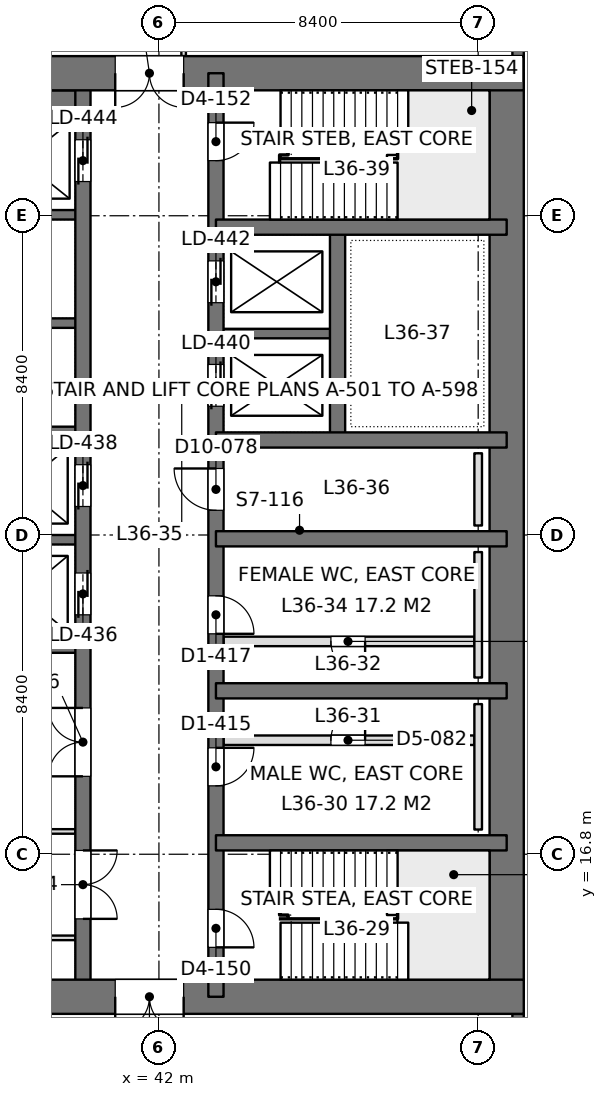
"""IFC4 building model, lengths in metres.
Left out: names, types, materials, properties, quantities, classifications, styles, units other than length and angle.
Written with IfcOpenShell. Run it as: python <this file> out.ifc"""

import sys

from ifc_helpers import new_model, si_unit, direction, frame, frame_2d, origin, place, context, subcontext, project, spatial, rectangle, extrude, element, fill, save


model = new_model("IFC4")
c1 = context("Model", 3, precision=1e-05, world=origin(), true_north=direction((0.0, 1.0)))
c2 = subcontext(c1, "Body", "Model", "MODEL_VIEW")
j1 = project(units=[si_unit("LENGTHUNIT", "METRE"), si_unit("PLANEANGLEUNIT", "RADIAN")], contexts=[c1])
p1 = place(None, origin())
s1 = spatial("IfcSite", under=j1, at=p1, CompositionType="ELEMENT")
p2 = place(p1, origin())
s2 = spatial("IfcBuilding", under=s1, at=p2, CompositionType="ELEMENT")
p3 = place(p2, frame((0.0, 0.0, 159.6)))
s3 = spatial("IfcBuildingStorey", under=s2, at=p3, CompositionType="ELEMENT", Elevation=159.6)
p4 = place(p3, frame((33.6, 13.05, 0.0), z_axis=(0.0, 0.0, 1.0), x_axis=(1.0, 0.0, 0.0)))
e1 = element("IfcWall", 1, at=p4, inside=s3, PredefinedType="SHEAR", context=c2, shape_type="SweptSolid", body=[
    extrude(rectangle(XDim=18.0, YDim=0.9, at=frame_2d((9.0, 0.0))), origin(), (0.0, 0.0, 1.0), 4.2),
])
p5 = place(p4, frame((7.25, 0.0, 0.0)))
e2 = element("IfcOpeningElement", 2, at=p5, cuts=e1, PredefinedType="OPENING", context=c2, shape_type="SweptSolid", body=[
    extrude(rectangle(XDim=1.8, YDim=2.4, at=frame_2d((0.9, 1.2))), frame((0.0, 0.46, 0.0), z_axis=(0.0, -1.0, 0.0), x_axis=(1.0, 0.0, 0.0)), (0.0, 0.0, 1.0), 0.92),
])
p6 = place(p3, frame((33.6, 37.35, 0.0), z_axis=(0.0, 0.0, 1.0), x_axis=(1.0, 0.0, 0.0)))
e3 = element("IfcWall", 3, at=p6, inside=s3, PredefinedType="SHEAR", context=c2, shape_type="SweptSolid", body=[
    extrude(rectangle(XDim=18.0, YDim=0.9, at=frame_2d((9.0, 0.0))), origin(), (0.0, 0.0, 1.0), 4.2),
])
p7 = place(p6, frame((7.25, 0.0, 0.0)))
e4 = element("IfcOpeningElement", 4, at=p7, cuts=e3, PredefinedType="OPENING", context=c2, shape_type="SweptSolid", body=[
    extrude(rectangle(XDim=1.8, YDim=2.4, at=frame_2d((0.9, 1.2))), frame((0.0, 0.46, 0.0), z_axis=(0.0, -1.0, 0.0), x_axis=(1.0, 0.0, 0.0)), (0.0, 0.0, 1.0), 0.92),
])
p8 = place(p3, frame((51.15, 13.05, 0.0), z_axis=(0.0, 0.0, 1.0), x_axis=(0.0, 1.0, 0.0)))
e5 = element("IfcWall", 5, at=p8, inside=s3, PredefinedType="SHEAR", context=c2, shape_type="SweptSolid", body=[
    extrude(rectangle(XDim=24.3, YDim=0.9, at=frame_2d((12.15, 0.0))), origin(), (0.0, 0.0, 1.0), 4.2),
])
p9 = place(p3, frame((43.5, 13.05, 0.0), z_axis=(0.0, 0.0, 1.0), x_axis=(0.0, 1.0, 0.0)))
e6 = element("IfcWall", 6, at=p9, inside=s3, PredefinedType="SHEAR", context=c2, shape_type="SweptSolid", body=[
    extrude(rectangle(XDim=24.3, YDim=0.4, at=frame_2d((12.15, 0.0))), origin(), (0.0, 0.0, 1.0), 4.2),
])
p10 = place(p9, frame((1.3, 0.0, 0.0)))
e7 = element("IfcOpeningElement", 7, at=p10, cuts=e6, PredefinedType="OPENING", context=c2, shape_type="SweptSolid", body=[
    extrude(rectangle(XDim=1.0, YDim=2.2, at=frame_2d((0.5, 1.1))), frame((0.0, 0.21, 0.0), z_axis=(0.0, -1.0, 0.0), x_axis=(1.0, 0.0, 0.0)), (0.0, 0.0, 1.0), 0.42),
])
p11 = place(p9, frame((22.0, 0.0, 0.0)))
e8 = element("IfcOpeningElement", 8, at=p11, cuts=e6, PredefinedType="OPENING", context=c2, shape_type="SweptSolid", body=[
    extrude(rectangle(XDim=1.0, YDim=2.2, at=frame_2d((0.5, 1.1))), frame((0.0, 0.21, 0.0), z_axis=(0.0, -1.0, 0.0), x_axis=(1.0, 0.0, 0.0)), (0.0, 0.0, 1.0), 0.42),
])
p12 = place(p9, frame((5.55, 0.0, 0.0)))
e9 = element("IfcOpeningElement", 9, at=p12, cuts=e6, PredefinedType="OPENING", context=c2, shape_type="SweptSolid", body=[
    extrude(rectangle(XDim=1.0, YDim=2.2, at=frame_2d((0.5, 1.1))), frame((0.0, 0.21, 0.0), z_axis=(0.0, -1.0, 0.0), x_axis=(1.0, 0.0, 0.0)), (0.0, 0.0, 1.0), 0.42),
])
p13 = place(p9, frame((9.55, 0.0, 0.0)))
e10 = element("IfcOpeningElement", 10, at=p13, cuts=e6, PredefinedType="OPENING", context=c2, shape_type="SweptSolid", body=[
    extrude(rectangle(XDim=1.0, YDim=2.2, at=frame_2d((0.5, 1.1))), frame((0.0, 0.21, 0.0), z_axis=(0.0, -1.0, 0.0), x_axis=(1.0, 0.0, 0.0)), (0.0, 0.0, 1.0), 0.42),
])
p14 = place(p9, frame((12.8, 0.0, 0.0)))
e11 = element("IfcOpeningElement", 11, at=p14, cuts=e6, PredefinedType="OPENING", context=c2, shape_type="SweptSolid", body=[
    extrude(rectangle(XDim=1.1, YDim=2.2, at=frame_2d((0.55, 1.1))), frame((0.0, 0.21, 0.0), z_axis=(0.0, -1.0, 0.0), x_axis=(1.0, 0.0, 0.0)), (0.0, 0.0, 1.0), 0.42),
])
p15 = place(p9, frame((15.538, 0.0, 0.0)))
e12 = element("IfcOpeningElement", 12, at=p15, cuts=e6, PredefinedType="OPENING", context=c2, shape_type="SweptSolid", body=[
    extrude(rectangle(XDim=1.1, YDim=2.2, at=frame_2d((0.55, 1.1))), frame((0.0, 0.21, 0.0), z_axis=(0.0, -1.0, 0.0), x_axis=(1.0, 0.0, 0.0)), (0.0, 0.0, 1.0), 0.42),
])
p16 = place(p9, frame((18.262, 0.0, 0.0)))
e13 = element("IfcOpeningElement", 13, at=p16, cuts=e6, PredefinedType="OPENING", context=c2, shape_type="SweptSolid", body=[
    extrude(rectangle(XDim=1.1, YDim=2.2, at=frame_2d((0.55, 1.1))), frame((0.0, 0.21, 0.0), z_axis=(0.0, -1.0, 0.0), x_axis=(1.0, 0.0, 0.0)), (0.0, 0.0, 1.0), 0.42),
])
p17 = place(p3, frame((40.0, 13.05, 0.0), z_axis=(0.0, 0.0, 1.0), x_axis=(0.0, 1.0, 0.0)))
e14 = element("IfcWall", 14, at=p17, inside=s3, PredefinedType="SHEAR", context=c2, shape_type="SweptSolid", body=[
    extrude(rectangle(XDim=24.3, YDim=0.4, at=frame_2d((12.15, 0.0))), origin(), (0.0, 0.0, 1.0), 4.2),
])
p18 = place(p17, frame((10.05, 0.0, 0.0)))
e15 = element("IfcOpeningElement", 15, at=p18, cuts=e14, PredefinedType="OPENING", context=c2, shape_type="SweptSolid", body=[
    extrude(rectangle(XDim=1.1, YDim=2.2, at=frame_2d((0.55, 1.1))), frame((0.0, 0.21, 0.0), z_axis=(0.0, -1.0, 0.0), x_axis=(1.0, 0.0, 0.0)), (0.0, 0.0, 1.0), 0.42),
])
p19 = place(p17, frame((12.9, 0.0, 0.0)))
e16 = element("IfcOpeningElement", 16, at=p19, cuts=e14, PredefinedType="OPENING", context=c2, shape_type="SweptSolid", body=[
    extrude(rectangle(XDim=1.1, YDim=2.2, at=frame_2d((0.55, 1.1))), frame((0.0, 0.21, 0.0), z_axis=(0.0, -1.0, 0.0), x_axis=(1.0, 0.0, 0.0)), (0.0, 0.0, 1.0), 0.42),
])
p20 = place(p17, frame((21.45, 0.0, 0.0)))
e17 = element("IfcOpeningElement", 17, at=p20, cuts=e14, PredefinedType="OPENING", context=c2, shape_type="SweptSolid", body=[
    extrude(rectangle(XDim=1.1, YDim=2.2, at=frame_2d((0.55, 1.1))), frame((0.0, 0.21, 0.0), z_axis=(0.0, -1.0, 0.0), x_axis=(1.0, 0.0, 0.0)), (0.0, 0.0, 1.0), 0.42),
])
p21 = place(p17, frame((2.05, 0.0, 0.0)))
e18 = element("IfcOpeningElement", 18, at=p21, cuts=e14, PredefinedType="OPENING", context=c2, shape_type="SweptSolid", body=[
    extrude(rectangle(XDim=1.8, YDim=2.4, at=frame_2d((0.9, 1.2))), frame((0.0, 0.21, 0.0), z_axis=(0.0, -1.0, 0.0), x_axis=(1.0, 0.0, 0.0)), (0.0, 0.0, 1.0), 0.42),
])
p22 = place(p17, frame((5.8, 0.0, 0.0)))
e19 = element("IfcOpeningElement", 19, at=p22, cuts=e14, PredefinedType="OPENING", context=c2, shape_type="SweptSolid", body=[
    extrude(rectangle(XDim=1.8, YDim=2.4, at=frame_2d((0.9, 1.2))), frame((0.0, 0.21, 0.0), z_axis=(0.0, -1.0, 0.0), x_axis=(1.0, 0.0, 0.0)), (0.0, 0.0, 1.0), 0.42),
])
for number, where, z_axis, x_axis in (
    (20, (51.15, 17.1, 0.0), (0.0, 0.0, 1.0), (-1.0, 0.0, 0.0)),
    (21, (51.15, 21.1, 0.0), (0.0, 0.0, 1.0), (-1.0, 0.0, 0.0)),
    (22, (51.15, 25.1, 0.0), (0.0, 0.0, 1.0), (-1.0, 0.0, 0.0)),
    (23, (51.15, 27.7, 0.0), (0.0, 0.0, 1.0), (-1.0, 0.0, 0.0)),
    (24, (51.15, 33.3, 0.0), (0.0, 0.0, 1.0), (-1.0, 0.0, 0.0)),
):
    element("IfcWall", number, at=place(p3, frame(where, z_axis=z_axis, x_axis=x_axis)), inside=s3, PredefinedType="SHEAR", context=c2, shape_type="SweptSolid", body=[
        extrude(rectangle(XDim=7.65, YDim=0.4, at=frame_2d((3.825, 0.0))), origin(), (0.0, 0.0, 1.0), 4.2),
    ])
p23 = place(p3, frame((46.7, 27.7, 0.0), z_axis=(0.0, 0.0, 1.0), x_axis=(0.0, 1.0, 0.0)))
e25 = element("IfcWall", 25, at=p23, inside=s3, PredefinedType="SHEAR", context=c2, shape_type="SweptSolid", body=[
    extrude(rectangle(XDim=5.6, YDim=0.4, at=frame_2d((2.8, 0.0))), origin(), (0.0, 0.0, 1.0), 4.2),
])
p24 = place(p3, frame((46.7, 30.5, 0.0), z_axis=(0.0, 0.0, 1.0), x_axis=(-1.0, 0.0, 0.0)))
e26 = element("IfcWall", 26, at=p24, inside=s3, PredefinedType="SHEAR", context=c2, shape_type="SweptSolid", body=[
    extrude(rectangle(XDim=3.2, YDim=0.25, at=frame_2d((1.6, 0.0))), origin(), (0.0, 0.0, 1.0), 4.2),
])
p25 = place(p3, frame((40.0, 22.225, 0.0), z_axis=(0.0, 0.0, 1.0), x_axis=(-1.0, 0.0, 0.0)))
e27 = element("IfcWall", 27, at=p25, inside=s3, PredefinedType="SHEAR", context=c2, shape_type="SweptSolid", body=[
    extrude(rectangle(XDim=5.95, YDim=0.25, at=frame_2d((2.975, 0.0))), origin(), (0.0, 0.0, 1.0), 4.2),
])
for number, where, z_axis, x_axis in (
    (28, (40.0, 25.075, 0.0), (0.0, 0.0, 1.0), (-1.0, 0.0, 0.0)),
    (29, (40.0, 27.925, 0.0), (0.0, 0.0, 1.0), (-1.0, 0.0, 0.0)),
    (30, (40.0, 30.775, 0.0), (0.0, 0.0, 1.0), (-1.0, 0.0, 0.0)),
    (31, (40.0, 33.625, 0.0), (0.0, 0.0, 1.0), (-1.0, 0.0, 0.0)),
):
    element("IfcWall", number, at=place(p3, frame(where, z_axis=z_axis, x_axis=x_axis)), inside=s3, PredefinedType="SHEAR", context=c2, shape_type="SweptSolid", body=[
        extrude(rectangle(XDim=3.2, YDim=0.25, at=frame_2d((1.6, 0.0))), origin(), (0.0, 0.0, 1.0), 4.2),
    ])
p26 = place(p3, frame((40.0, 36.625, 0.0), z_axis=(0.0, 0.0, 1.0), x_axis=(-1.0, 0.0, 0.0)))
e32 = element("IfcWall", 32, at=p26, inside=s3, PredefinedType="SHEAR", context=c2, shape_type="SweptSolid", body=[
    extrude(rectangle(XDim=3.2, YDim=0.55, at=frame_2d((1.6, 0.0))), origin(), (0.0, 0.0, 1.0), 4.2),
])
p27 = place(p3, frame((51.45, 42.0, 0.0), z_axis=(0.0, 0.0, 1.0), x_axis=(0.0, -1.0, 0.0)))
e33 = element("IfcWall", 33, at=p27, inside=s3, PredefinedType="SOLIDWALL", context=c2, shape_type="SweptSolid", body=[
    extrude(rectangle(XDim=4.2, YDim=0.3, at=frame_2d((2.1, 0.0))), origin(), (0.0, 0.0, 1.0), 4.05),
])
p28 = place(p27, frame((0.9, 0.0, 0.9)))
e34 = element("IfcOpeningElement", 34, at=p28, cuts=e33, PredefinedType="OPENING", context=c2, shape_type="SweptSolid", body=[
    extrude(rectangle(XDim=2.4, YDim=1.9, at=frame_2d((1.2, 0.95))), frame((0.0, 0.16, 0.0), z_axis=(0.0, -1.0, 0.0), x_axis=(1.0, 0.0, 0.0)), (0.0, 0.0, 1.0), 0.32),
])
p29 = place(p3, frame((51.45, 12.6, 0.0), z_axis=(0.0, 0.0, 1.0), x_axis=(0.0, -1.0, 0.0)))
e35 = element("IfcWall", 35, at=p29, inside=s3, PredefinedType="SOLIDWALL", context=c2, shape_type="SweptSolid", body=[
    extrude(rectangle(XDim=4.2, YDim=0.3, at=frame_2d((2.1, 0.0))), origin(), (0.0, 0.0, 1.0), 4.05),
])
p30 = place(p29, frame((0.9, 0.0, 0.9)))
e36 = element("IfcOpeningElement", 36, at=p30, cuts=e35, PredefinedType="OPENING", context=c2, shape_type="SweptSolid", body=[
    extrude(rectangle(XDim=2.4, YDim=1.9, at=frame_2d((1.2, 0.95))), frame((0.0, 0.16, 0.0), z_axis=(0.0, -1.0, 0.0), x_axis=(1.0, 0.0, 0.0)), (0.0, 0.0, 1.0), 0.32),
])
p31 = place(p3, frame((33.898, 17.4, 0.0), z_axis=(0.0, 0.0, 1.0), x_axis=(1.0, 0.0, 0.0)))
e37 = element("IfcWall", 37, at=p31, inside=s3, PredefinedType="PARTITIONING", context=c2, shape_type="SweptSolid", body=[
    extrude(rectangle(XDim=5.904, YDim=0.12, at=frame_2d((2.952, 0.0))), origin(), (0.0, 0.0, 1.0), 3.55),
])
p32 = place(p3, frame((33.598, 14.6, 0.0), z_axis=(0.0, 0.0, 1.0), x_axis=(1.0, 0.0, 0.0)))
e38 = element("IfcWall", 38, at=p32, inside=s3, PredefinedType="PARTITIONING", context=c2, shape_type="SweptSolid", body=[
    extrude(rectangle(XDim=6.204, YDim=0.12, at=frame_2d((3.102, 0.0))), origin(), (0.0, 0.0, 1.0), 3.55),
])
p33 = place(p3, frame((42.65, 37.8, 0.0), z_axis=(0.0, 0.0, 1.0), x_axis=(0.0, 1.0, 0.0)))
e39 = element("IfcWall", 39, at=p33, inside=s3, PredefinedType="PARTITIONING", context=c2, shape_type="SweptSolid", body=[
    extrude(rectangle(XDim=2.0, YDim=0.12, at=frame_2d((1.0, 0.0))), origin(), (0.0, 0.0, 1.0), 4.05),
])
p34 = place(p3, frame((43.7, 22.4, 0.0), z_axis=(0.0, 0.0, 1.0), x_axis=(1.0, 0.0, 0.0)))
e40 = element("IfcWall", 40, at=p34, inside=s3, PredefinedType="PARTITIONING", context=c2, shape_type="SweptSolid", body=[
    extrude(rectangle(XDim=6.6, YDim=0.25, at=frame_2d((3.3, 0.0))), origin(), (0.0, 0.0, 1.0), 4.0),
])
p35 = place(p34, frame((2.825, 0.0, 0.0)))
e41 = element("IfcOpeningElement", 41, at=p35, cuts=e40, PredefinedType="OPENING", context=c2, shape_type="SweptSolid", body=[
    extrude(rectangle(XDim=0.9, YDim=2.2, at=frame_2d((0.45, 1.1))), frame((0.0, 0.135, 0.0), z_axis=(0.0, -1.0, 0.0), x_axis=(1.0, 0.0, 0.0)), (0.0, 0.0, 1.0), 0.27),
])
p36 = place(p3, frame((43.7, 19.8, 0.0), z_axis=(0.0, 0.0, 1.0), x_axis=(1.0, 0.0, 0.0)))
e42 = element("IfcWall", 42, at=p36, inside=s3, PredefinedType="PARTITIONING", context=c2, shape_type="SweptSolid", body=[
    extrude(rectangle(XDim=6.6, YDim=0.25, at=frame_2d((3.3, 0.0))), origin(), (0.0, 0.0, 1.0), 4.0),
])
p37 = place(p36, frame((2.825, 0.0, 0.0)))
e43 = element("IfcOpeningElement", 43, at=p37, cuts=e42, PredefinedType="OPENING", context=c2, shape_type="SweptSolid", body=[
    extrude(rectangle(XDim=0.9, YDim=2.2, at=frame_2d((0.45, 1.1))), frame((0.0, 0.135, 0.0), z_axis=(0.0, -1.0, 0.0), x_axis=(1.0, 0.0, 0.0)), (0.0, 0.0, 1.0), 0.27),
])
for number, where, z_axis, x_axis in (
    (44, (50.4, 17.45, 0.0), (0.0, 0.0, 1.0), (0.0, 1.0, 0.0)),
    (45, (50.4, 21.45, 0.0), (0.0, 0.0, 1.0), (0.0, 1.0, 0.0)),
):
    element("IfcWall", number, at=place(p3, frame(where, z_axis=z_axis, x_axis=x_axis)), inside=s3, PredefinedType="PLUMBINGWALL", context=c2, shape_type="SweptSolid", body=[
        extrude(rectangle(XDim=3.3, YDim=0.2, at=frame_2d((1.65, 0.0))), origin(), (0.0, 0.0, 1.0), 1.2),
    ])
p38 = place(p3, frame((50.4, 25.45, 0.0), z_axis=(0.0, 0.0, 1.0), x_axis=(0.0, 1.0, 0.0)))
e46 = element("IfcWall", 46, at=p38, inside=s3, PredefinedType="PLUMBINGWALL", context=c2, shape_type="SweptSolid", body=[
    extrude(rectangle(XDim=1.9, YDim=0.2, at=frame_2d((0.95, 0.0))), origin(), (0.0, 0.0, 1.0), 1.2),
])
p39 = place(p5, frame((1.8, 0.0, 0.0), z_axis=(0.0, 0.0, 1.0), x_axis=(-1.0, 0.0, 0.0)))
e47 = element("IfcDoor", 47, at=p39, inside=s3, OperationType="DOUBLE_DOOR_SINGLE_SWING", PredefinedType="DOOR", context=c2, shape_type="SweptSolid", body=[
    extrude(rectangle(XDim=1.8, YDim=2.4, at=frame_2d((0.9, 1.2))), frame((0.0, 0.025, 0.0), z_axis=(0.0, -1.0, 0.0), x_axis=(1.0, 0.0, 0.0)), (0.0, 0.0, 1.0), 0.05),
])
fill(e2, e47)
p40 = place(p7, frame((1.8, 0.0, 0.0), z_axis=(0.0, 0.0, 1.0), x_axis=(-1.0, 0.0, 0.0)))
e48 = element("IfcDoor", 48, at=p40, inside=s3, OperationType="DOUBLE_DOOR_SINGLE_SWING", PredefinedType="DOOR", context=c2, shape_type="SweptSolid", body=[
    extrude(rectangle(XDim=1.8, YDim=2.4, at=frame_2d((0.9, 1.2))), frame((0.0, 0.025, 0.0), z_axis=(0.0, -1.0, 0.0), x_axis=(1.0, 0.0, 0.0)), (0.0, 0.0, 1.0), 0.05),
])
fill(e4, e48)
p41 = place(p10, frame((1.0, 0.0, 0.0), z_axis=(0.0, 0.0, 1.0), x_axis=(-1.0, 0.0, 0.0)))
e49 = element("IfcDoor", 49, at=p41, inside=s3, OperationType="SINGLE_SWING_RIGHT", PredefinedType="DOOR", context=c2, shape_type="SweptSolid", body=[
    extrude(rectangle(XDim=1.0, YDim=2.2, at=frame_2d((0.5, 1.1))), frame((0.0, 0.025, 0.0), z_axis=(0.0, -1.0, 0.0), x_axis=(1.0, 0.0, 0.0)), (0.0, 0.0, 1.0), 0.05),
])
fill(e7, e49)
p42 = place(p11, frame((1.0, 0.0, 0.0), z_axis=(0.0, 0.0, 1.0), x_axis=(-1.0, 0.0, 0.0)))
e50 = element("IfcDoor", 50, at=p42, inside=s3, OperationType="SINGLE_SWING_LEFT", PredefinedType="DOOR", context=c2, shape_type="SweptSolid", body=[
    extrude(rectangle(XDim=1.0, YDim=2.2, at=frame_2d((0.5, 1.1))), frame((0.0, 0.025, 0.0), z_axis=(0.0, -1.0, 0.0), x_axis=(1.0, 0.0, 0.0)), (0.0, 0.0, 1.0), 0.05),
])
fill(e8, e50)
p43 = place(p12, frame((1.0, 0.0, 0.0), z_axis=(0.0, 0.0, 1.0), x_axis=(-1.0, 0.0, 0.0)))
e51 = element("IfcDoor", 51, at=p43, inside=s3, OperationType="SINGLE_SWING_LEFT", PredefinedType="DOOR", context=c2, shape_type="SweptSolid", body=[
    extrude(rectangle(XDim=1.0, YDim=2.2, at=frame_2d((0.5, 1.1))), frame((0.0, 0.025, 0.0), z_axis=(0.0, -1.0, 0.0), x_axis=(1.0, 0.0, 0.0)), (0.0, 0.0, 1.0), 0.05),
])
fill(e9, e51)
p44 = place(p13, frame((1.0, 0.0, 0.0), z_axis=(0.0, 0.0, 1.0), x_axis=(-1.0, 0.0, 0.0)))
e52 = element("IfcDoor", 52, at=p44, inside=s3, OperationType="SINGLE_SWING_RIGHT", PredefinedType="DOOR", context=c2, shape_type="SweptSolid", body=[
    extrude(rectangle(XDim=1.0, YDim=2.2, at=frame_2d((0.5, 1.1))), frame((0.0, 0.025, 0.0), z_axis=(0.0, -1.0, 0.0), x_axis=(1.0, 0.0, 0.0)), (0.0, 0.0, 1.0), 0.05),
])
fill(e10, e52)
p45 = place(p14, origin())
e53 = element("IfcDoor", 53, at=p45, inside=s3, OperationType="SINGLE_SWING_RIGHT", PredefinedType="DOOR", context=c2, shape_type="SweptSolid", body=[
    extrude(rectangle(XDim=1.1, YDim=2.2, at=frame_2d((0.55, 1.1))), frame((0.0, 0.025, 0.0), z_axis=(0.0, -1.0, 0.0), x_axis=(1.0, 0.0, 0.0)), (0.0, 0.0, 1.0), 0.05),
])
fill(e11, e53)
p46 = place(p18, origin())
e54 = element("IfcDoor", 54, at=p46, inside=s3, OperationType="DOUBLE_DOOR_SLIDING", PredefinedType="DOOR", context=c2, shape_type="SweptSolid", body=[
    extrude(rectangle(XDim=1.1, YDim=2.2, at=frame_2d((0.55, 1.1))), frame((0.0, 0.025, 0.0), z_axis=(0.0, -1.0, 0.0), x_axis=(1.0, 0.0, 0.0)), (0.0, 0.0, 1.0), 0.05),
])
fill(e15, e54)
p47 = place(p19, origin())
e55 = element("IfcDoor", 55, at=p47, inside=s3, OperationType="DOUBLE_DOOR_SLIDING", PredefinedType="DOOR", context=c2, shape_type="SweptSolid", body=[
    extrude(rectangle(XDim=1.1, YDim=2.2, at=frame_2d((0.55, 1.1))), frame((0.0, 0.025, 0.0), z_axis=(0.0, -1.0, 0.0), x_axis=(1.0, 0.0, 0.0)), (0.0, 0.0, 1.0), 0.05),
])
fill(e16, e55)
p48 = place(p20, origin())
e56 = element("IfcDoor", 56, at=p48, inside=s3, OperationType="DOUBLE_DOOR_SLIDING", PredefinedType="DOOR", context=c2, shape_type="SweptSolid", body=[
    extrude(rectangle(XDim=1.1, YDim=2.2, at=frame_2d((0.55, 1.1))), frame((0.0, 0.025, 0.0), z_axis=(0.0, -1.0, 0.0), x_axis=(1.0, 0.0, 0.0)), (0.0, 0.0, 1.0), 0.05),
])
fill(e17, e56)
p49 = place(p15, origin())
e57 = element("IfcDoor", 57, at=p49, inside=s3, OperationType="DOUBLE_DOOR_SLIDING", PredefinedType="DOOR", context=c2, shape_type="SweptSolid", body=[
    extrude(rectangle(XDim=1.1, YDim=2.2, at=frame_2d((0.55, 1.1))), frame((0.0, 0.025, 0.0), z_axis=(0.0, -1.0, 0.0), x_axis=(1.0, 0.0, 0.0)), (0.0, 0.0, 1.0), 0.05),
])
fill(e12, e57)
p50 = place(p16, origin())
e58 = element("IfcDoor", 58, at=p50, inside=s3, OperationType="DOUBLE_DOOR_SLIDING", PredefinedType="DOOR", context=c2, shape_type="SweptSolid", body=[
    extrude(rectangle(XDim=1.1, YDim=2.2, at=frame_2d((0.55, 1.1))), frame((0.0, 0.025, 0.0), z_axis=(0.0, -1.0, 0.0), x_axis=(1.0, 0.0, 0.0)), (0.0, 0.0, 1.0), 0.05),
])
fill(e13, e58)
p51 = place(p21, frame((1.8, 0.0, 0.0), z_axis=(0.0, 0.0, 1.0), x_axis=(-1.0, 0.0, 0.0)))
e59 = element("IfcDoor", 59, at=p51, inside=s3, OperationType="DOUBLE_DOOR_SINGLE_SWING", PredefinedType="DOOR", context=c2, shape_type="SweptSolid", body=[
    extrude(rectangle(XDim=1.8, YDim=2.4, at=frame_2d((0.9, 1.2))), frame((0.0, 0.025, 0.0), z_axis=(0.0, -1.0, 0.0), x_axis=(1.0, 0.0, 0.0)), (0.0, 0.0, 1.0), 0.05),
])
fill(e18, e59)
p52 = place(p22, origin())
e60 = element("IfcDoor", 60, at=p52, inside=s3, OperationType="DOUBLE_DOOR_SINGLE_SWING", PredefinedType="DOOR", context=c2, shape_type="SweptSolid", body=[
    extrude(rectangle(XDim=1.8, YDim=2.4, at=frame_2d((0.9, 1.2))), frame((0.0, 0.025, 0.0), z_axis=(0.0, -1.0, 0.0), x_axis=(1.0, 0.0, 0.0)), (0.0, 0.0, 1.0), 0.05),
])
fill(e19, e60)
p53 = place(p35, frame((0.9, 0.0, 0.0), z_axis=(0.0, 0.0, 1.0), x_axis=(-1.0, 0.0, 0.0)))
e61 = element("IfcDoor", 61, at=p53, inside=s3, OperationType="SINGLE_SWING_LEFT", PredefinedType="DOOR", context=c2, shape_type="SweptSolid", body=[
    extrude(rectangle(XDim=0.9, YDim=2.2, at=frame_2d((0.45, 1.1))), frame((0.0, 0.025, 0.0), z_axis=(0.0, -1.0, 0.0), x_axis=(1.0, 0.0, 0.0)), (0.0, 0.0, 1.0), 0.05),
])
fill(e41, e61)
p54 = place(p37, origin())
e62 = element("IfcDoor", 62, at=p54, inside=s3, OperationType="SINGLE_SWING_RIGHT", PredefinedType="DOOR", context=c2, shape_type="SweptSolid", body=[
    extrude(rectangle(XDim=0.9, YDim=2.2, at=frame_2d((0.45, 1.1))), frame((0.0, 0.025, 0.0), z_axis=(0.0, -1.0, 0.0), x_axis=(1.0, 0.0, 0.0)), (0.0, 0.0, 1.0), 0.05),
])
fill(e43, e62)
save(model, sys.argv[1])
